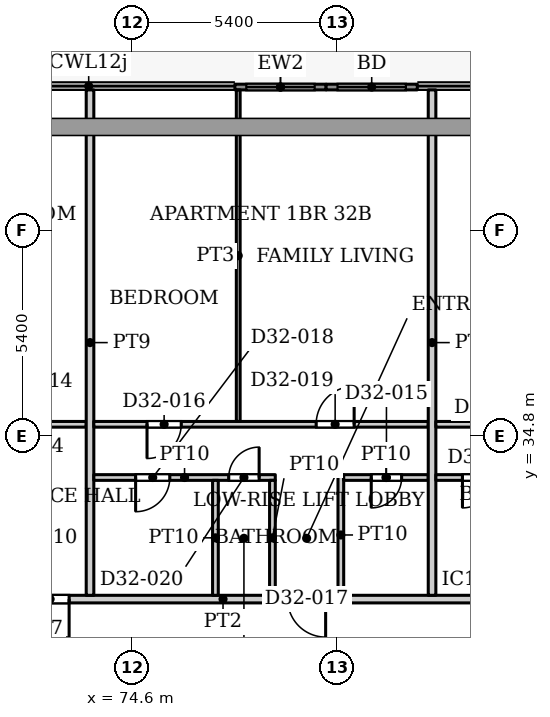
"""IFC4 building model, lengths in metres.
Left out: names, types, materials, properties, quantities, classifications, styles, units other than length and angle.
Written with IfcOpenShell. Run it as: python <this file> out.ifc"""

import sys

from ifc_helpers import new_model, si_unit, direction, frame, frame_2d, origin, place, context, subcontext, project, spatial, rectangle, extrude, source, transform, mapped, element, fill, save


model = new_model("IFC4")
c1 = context("Model", 3, precision=1e-05, world=origin(), true_north=direction((0.0, 1.0)))
c2 = subcontext(c1, "Body", "Model", "MODEL_VIEW")
j1 = project(units=[si_unit("LENGTHUNIT", "METRE"), si_unit("PLANEANGLEUNIT", "RADIAN")], contexts=[c1])
p1 = place(None, origin())
s1 = spatial("IfcSite", under=j1, at=p1, CompositionType="ELEMENT")
p2 = place(p1, origin())
s2 = spatial("IfcBuilding", under=s1, at=p2, CompositionType="ELEMENT")
p3 = place(p2, frame((0.0, 0.0, 137.0)))
s3 = spatial("IfcBuildingStorey", under=s2, at=p3, CompositionType="ELEMENT", Elevation=137.0)
p4 = place(p3, frame((77.312, 43.975, 0.0), z_axis=(0.0, 0.0, 1.0), x_axis=(1.0, 0.0, 0.0)))
e1 = element("IfcWall", 1, at=p4, inside=s3, PredefinedType="SOLIDWALL", context=c2, shape_type="SweptSolid", body=[
    extrude(rectangle(XDim=2.4, YDim=0.15, at=frame_2d((1.2, 0.0))), origin(), (0.0, 0.0, 1.0), 3.75),
])
p5 = place(p4, frame((0.3, 0.0, 0.0)))
e2 = element("IfcOpeningElement", 2, at=p5, cuts=e1, PredefinedType="OPENING", context=c2, shape_type="SweptSolid", body=[
    extrude(rectangle(XDim=1.8, YDim=2.4, at=frame_2d((0.9, 1.2))), frame((0.0, 0.085, 0.0), z_axis=(0.0, -1.0, 0.0), x_axis=(1.0, 0.0, 0.0)), (0.0, 0.0, 1.0), 0.17),
])
p6 = place(p3, frame((79.712, 43.975, 0.0), z_axis=(0.0, 0.0, 1.0), x_axis=(1.0, 0.0, 0.0)))
e3 = element("IfcWall", 3, at=p6, inside=s3, PredefinedType="SOLIDWALL", context=c2, shape_type="SweptSolid", body=[
    extrude(rectangle(XDim=2.4, YDim=0.15, at=frame_2d((1.2, 0.0))), origin(), (0.0, 0.0, 1.0), 3.75),
])
p7 = place(p6, frame((0.3, 0.0, 0.0)))
e4 = element("IfcOpeningElement", 4, at=p7, cuts=e3, PredefinedType="OPENING", context=c2, shape_type="SweptSolid", body=[
    extrude(rectangle(XDim=1.8, YDim=2.4, at=frame_2d((0.9, 1.2))), frame((0.0, 0.085, 0.0), z_axis=(0.0, -1.0, 0.0), x_axis=(1.0, 0.0, 0.0)), (0.0, 0.0, 1.0), 0.17),
])
p8 = place(p3, frame((55.9, 30.5, 0.0), z_axis=(0.0, 0.0, 1.0), x_axis=(1.0, 0.0, 0.0)))
e5 = element("IfcWall", 5, at=p8, inside=s3, PredefinedType="PARTITIONING", context=c2, shape_type="SweptSolid", body=[
    extrude(rectangle(XDim=42.2, YDim=0.2, at=frame_2d((21.1, 0.0))), origin(), (0.0, 0.0, 1.0), 3.6),
])
p9 = place(p8, frame((16.05, 0.0, 0.0)))
e6 = element("IfcOpeningElement", 6, at=p9, cuts=e5, PredefinedType="OPENING", context=c2, shape_type="SweptSolid", body=[
    extrude(rectangle(XDim=1.0, YDim=2.1, at=frame_2d((0.5, 1.05))), frame((0.0, 0.11, 0.0), z_axis=(0.0, -1.0, 0.0), x_axis=(1.0, 0.0, 0.0)), (0.0, 0.0, 1.0), 0.22),
])
p10 = place(p8, frame((22.8, 0.0, 0.0)))
e7 = element("IfcOpeningElement", 7, at=p10, cuts=e5, PredefinedType="OPENING", context=c2, shape_type="SweptSolid", body=[
    extrude(rectangle(XDim=1.0, YDim=2.1, at=frame_2d((0.5, 1.05))), frame((0.0, 0.11, 0.0), z_axis=(0.0, -1.0, 0.0), x_axis=(1.0, 0.0, 0.0)), (0.0, 0.0, 1.0), 0.22),
])
p11 = place(p8, frame((29.55, 0.0, 0.0)))
e8 = element("IfcOpeningElement", 8, at=p11, cuts=e5, PredefinedType="OPENING", context=c2, shape_type="SweptSolid", body=[
    extrude(rectangle(XDim=1.0, YDim=2.1, at=frame_2d((0.5, 1.05))), frame((0.0, 0.11, 0.0), z_axis=(0.0, -1.0, 0.0), x_axis=(1.0, 0.0, 0.0)), (0.0, 0.0, 1.0), 0.22),
])
p12 = place(p3, frame((55.9, 35.1, 0.0), z_axis=(0.0, 0.0, 1.0), x_axis=(1.0, 0.0, 0.0)))
e9 = element("IfcWall", 9, at=p12, inside=s3, PredefinedType="PARTITIONING", context=c2, shape_type="SweptSolid", body=[
    extrude(rectangle(XDim=17.5, YDim=0.15, at=frame_2d((8.75, 0.0))), origin(), (0.0, 0.0, 1.0), 3.6),
])
p13 = place(p12, frame((0.95, 0.0, 0.0)))
e10 = element("IfcOpeningElement", 10, at=p13, cuts=e9, PredefinedType="OPENING", context=c2, shape_type="SweptSolid", body=[
    extrude(rectangle(XDim=0.9, YDim=2.1, at=frame_2d((0.45, 1.05))), frame((0.0, 0.085, 0.0), z_axis=(0.0, -1.0, 0.0), x_axis=(1.0, 0.0, 0.0)), (0.0, 0.0, 1.0), 0.17),
])
p14 = place(p12, frame((15.35, 0.0, 0.0)))
e11 = element("IfcOpeningElement", 11, at=p14, cuts=e9, PredefinedType="OPENING", context=c2, shape_type="SweptSolid", body=[
    extrude(rectangle(XDim=0.9, YDim=2.1, at=frame_2d((0.45, 1.05))), frame((0.0, 0.085, 0.0), z_axis=(0.0, -1.0, 0.0), x_axis=(1.0, 0.0, 0.0)), (0.0, 0.0, 1.0), 0.17),
])
p15 = place(p12, frame((7.5, 0.0, 0.0)))
e12 = element("IfcOpeningElement", 12, at=p15, cuts=e9, PredefinedType="OPENING", context=c2, shape_type="SweptSolid", body=[
    extrude(rectangle(XDim=1.0, YDim=2.1, at=frame_2d((0.5, 1.05))), frame((0.0, 0.085, 0.0), z_axis=(0.0, -1.0, 0.0), x_axis=(1.0, 0.0, 0.0)), (0.0, 0.0, 1.0), 0.17),
])
p16 = place(p12, frame((3.6, 0.0, 0.0)))
e13 = element("IfcOpeningElement", 13, at=p16, cuts=e9, PredefinedType="OPENING", context=c2, shape_type="SweptSolid", body=[
    extrude(rectangle(XDim=1.6, YDim=2.1, at=frame_2d((0.8, 1.05))), frame((0.0, 0.085, 0.0), z_axis=(0.0, -1.0, 0.0), x_axis=(1.0, 0.0, 0.0)), (0.0, 0.0, 1.0), 0.17),
])
p17 = place(p12, frame((10.55, 0.0, 0.0)))
e14 = element("IfcOpeningElement", 14, at=p17, cuts=e9, PredefinedType="OPENING", context=c2, shape_type="SweptSolid", body=[
    extrude(rectangle(XDim=0.9, YDim=2.1, at=frame_2d((0.45, 1.05))), frame((0.0, 0.085, 0.0), z_axis=(0.0, -1.0, 0.0), x_axis=(1.0, 0.0, 0.0)), (0.0, 0.0, 1.0), 0.17),
])
p18 = place(p3, frame((73.5, 30.6, 0.0), z_axis=(0.0, 0.0, 1.0), x_axis=(0.0, 1.0, 0.0)))
e15 = element("IfcWall", 15, at=p18, inside=s3, PredefinedType="PARTITIONING", context=c2, shape_type="SweptSolid", body=[
    extrude(rectangle(XDim=13.3, YDim=0.2, at=frame_2d((6.65, 0.0))), origin(), (0.0, 0.0, 1.0), 3.6),
])
p19 = place(p3, frame((73.6, 33.7, 0.0), z_axis=(0.0, 0.0, 1.0), x_axis=(1.0, 0.0, 0.0)))
e16 = element("IfcWall", 16, at=p19, inside=s3, PredefinedType="PARTITIONING", context=c2, shape_type="SweptSolid", body=[
    extrude(rectangle(XDim=4.775, YDim=0.15, at=frame_2d((2.387, 0.0))), origin(), (0.0, 0.0, 1.0), 3.6),
])
p20 = place(p19, frame((1.1, 0.0, 0.0)))
e17 = element("IfcOpeningElement", 17, at=p20, cuts=e16, PredefinedType="OPENING", context=c2, shape_type="SweptSolid", body=[
    extrude(rectangle(XDim=0.9, YDim=2.1, at=frame_2d((0.45, 1.05))), frame((0.0, 0.085, 0.0), z_axis=(0.0, -1.0, 0.0), x_axis=(1.0, 0.0, 0.0)), (0.0, 0.0, 1.0), 0.17),
])
p21 = place(p19, frame((3.55, 0.0, 0.0)))
e18 = element("IfcOpeningElement", 18, at=p21, cuts=e16, PredefinedType="OPENING", context=c2, shape_type="SweptSolid", body=[
    extrude(rectangle(XDim=0.8, YDim=2.1, at=frame_2d((0.4, 1.05))), frame((0.0, 0.085, 0.0), z_axis=(0.0, -1.0, 0.0), x_axis=(1.0, 0.0, 0.0)), (0.0, 0.0, 1.0), 0.17),
])
p22 = place(p3, frame((73.6, 35.1, 0.0), z_axis=(0.0, 0.0, 1.0), x_axis=(1.0, 0.0, 0.0)))
e19 = element("IfcWall", 19, at=p22, inside=s3, PredefinedType="PARTITIONING", context=c2, shape_type="SweptSolid", body=[
    extrude(rectangle(XDim=8.8, YDim=0.15, at=frame_2d((4.4, 0.0))), origin(), (0.0, 0.0, 1.0), 3.6),
])
p23 = place(p22, frame((1.4, 0.0, 0.0)))
e20 = element("IfcOpeningElement", 20, at=p23, cuts=e19, PredefinedType="OPENING", context=c2, shape_type="SweptSolid", body=[
    extrude(rectangle(XDim=0.9, YDim=2.1, at=frame_2d((0.45, 1.05))), frame((0.0, 0.085, 0.0), z_axis=(0.0, -1.0, 0.0), x_axis=(1.0, 0.0, 0.0)), (0.0, 0.0, 1.0), 0.17),
])
p24 = place(p22, frame((5.85, 0.0, 0.0)))
e21 = element("IfcOpeningElement", 21, at=p24, cuts=e19, PredefinedType="OPENING", context=c2, shape_type="SweptSolid", body=[
    extrude(rectangle(XDim=1.0, YDim=2.1, at=frame_2d((0.5, 1.05))), frame((0.0, 0.085, 0.0), z_axis=(0.0, -1.0, 0.0), x_axis=(1.0, 0.0, 0.0)), (0.0, 0.0, 1.0), 0.17),
])
p25 = place(p3, frame((76.8, 30.6, 0.0), z_axis=(0.0, 0.0, 1.0), x_axis=(0.0, 1.0, 0.0)))
e22 = element("IfcWall", 22, at=p25, inside=s3, PredefinedType="PARTITIONING", context=c2, shape_type="SweptSolid", body=[
    extrude(rectangle(XDim=3.025, YDim=0.15, at=frame_2d((1.512, 0.0))), origin(), (0.0, 0.0, 1.0), 3.6),
])
p26 = place(p3, frame((77.4, 35.175, 0.0), z_axis=(0.0, 0.0, 1.0), x_axis=(0.0, 1.0, 0.0)))
e23 = element("IfcWall", 23, at=p26, inside=s3, PredefinedType="PARTITIONING", context=c2, shape_type="SweptSolid", body=[
    extrude(rectangle(XDim=8.725, YDim=0.1, at=frame_2d((4.362, 0.0))), origin(), (0.0, 0.0, 1.0), 3.6),
])
p27 = place(p3, frame((78.3, 30.6, 0.0), z_axis=(0.0, 0.0, 1.0), x_axis=(0.0, 1.0, 0.0)))
e24 = element("IfcWall", 24, at=p27, inside=s3, PredefinedType="PARTITIONING", context=c2, shape_type="SweptSolid", body=[
    extrude(rectangle(XDim=3.025, YDim=0.15, at=frame_2d((1.512, 0.0))), origin(), (0.0, 0.0, 1.0), 3.6),
])
p28 = place(p3, frame((80.1, 30.6, 0.0), z_axis=(0.0, 0.0, 1.0), x_axis=(0.0, 1.0, 0.0)))
e25 = element("IfcWall", 25, at=p28, inside=s3, PredefinedType="PARTITIONING", context=c2, shape_type="SweptSolid", body=[
    extrude(rectangle(XDim=3.175, YDim=0.15, at=frame_2d((1.587, 0.0))), origin(), (0.0, 0.0, 1.0), 3.6),
])
p29 = place(p3, frame((80.175, 33.7, 0.0), z_axis=(0.0, 0.0, 1.0), x_axis=(1.0, 0.0, 0.0)))
e26 = element("IfcWall", 26, at=p29, inside=s3, PredefinedType="PARTITIONING", context=c2, shape_type="SweptSolid", body=[
    extrude(rectangle(XDim=2.225, YDim=0.15, at=frame_2d((1.112, 0.0))), origin(), (0.0, 0.0, 1.0), 3.6),
])
p30 = place(p29, frame((0.725, 0.0, 0.0)))
e27 = element("IfcOpeningElement", 27, at=p30, cuts=e26, PredefinedType="OPENING", context=c2, shape_type="SweptSolid", body=[
    extrude(rectangle(XDim=0.8, YDim=2.1, at=frame_2d((0.4, 1.05))), frame((0.0, 0.085, 0.0), z_axis=(0.0, -1.0, 0.0), x_axis=(1.0, 0.0, 0.0)), (0.0, 0.0, 1.0), 0.17),
])
p31 = place(p3, frame((82.5, 30.6, 0.0), z_axis=(0.0, 0.0, 1.0), x_axis=(0.0, 1.0, 0.0)))
e28 = element("IfcWall", 28, at=p31, inside=s3, PredefinedType="PARTITIONING", context=c2, shape_type="SweptSolid", body=[
    extrude(rectangle(XDim=13.3, YDim=0.2, at=frame_2d((6.65, 0.0))), origin(), (0.0, 0.0, 1.0), 3.6),
])
p32 = place(p3, frame((82.6, 33.7, 0.0), z_axis=(0.0, 0.0, 1.0), x_axis=(1.0, 0.0, 0.0)))
e29 = element("IfcWall", 29, at=p32, inside=s3, PredefinedType="PARTITIONING", context=c2, shape_type="SweptSolid", body=[
    extrude(rectangle(XDim=2.225, YDim=0.15, at=frame_2d((1.112, 0.0))), origin(), (0.0, 0.0, 1.0), 3.6),
])
p33 = place(p32, frame((0.7, 0.0, 0.0)))
e30 = element("IfcOpeningElement", 30, at=p33, cuts=e29, PredefinedType="OPENING", context=c2, shape_type="SweptSolid", body=[
    extrude(rectangle(XDim=0.8, YDim=2.1, at=frame_2d((0.4, 1.05))), frame((0.0, 0.085, 0.0), z_axis=(0.0, -1.0, 0.0), x_axis=(1.0, 0.0, 0.0)), (0.0, 0.0, 1.0), 0.17),
])
p34 = place(p3, frame((82.6, 35.1, 0.0), z_axis=(0.0, 0.0, 1.0), x_axis=(1.0, 0.0, 0.0)))
e31 = element("IfcWall", 31, at=p34, inside=s3, PredefinedType="PARTITIONING", context=c2, shape_type="SweptSolid", body=[
    extrude(rectangle(XDim=17.3, YDim=0.15, at=frame_2d((8.65, 0.0))), origin(), (0.0, 0.0, 1.0), 3.6),
])
p35 = place(p34, frame((4.85, 0.0, 0.0)))
e32 = element("IfcOpeningElement", 32, at=p35, cuts=e31, PredefinedType="OPENING", context=c2, shape_type="SweptSolid", body=[
    extrude(rectangle(XDim=0.9, YDim=2.1, at=frame_2d((0.45, 1.05))), frame((0.0, 0.085, 0.0), z_axis=(0.0, -1.0, 0.0), x_axis=(1.0, 0.0, 0.0)), (0.0, 0.0, 1.0), 0.17),
])
p36 = place(p34, frame((11.15, 0.0, 0.0)))
e33 = element("IfcOpeningElement", 33, at=p36, cuts=e31, PredefinedType="OPENING", context=c2, shape_type="SweptSolid", body=[
    extrude(rectangle(XDim=0.9, YDim=2.1, at=frame_2d((0.45, 1.05))), frame((0.0, 0.085, 0.0), z_axis=(0.0, -1.0, 0.0), x_axis=(1.0, 0.0, 0.0)), (0.0, 0.0, 1.0), 0.17),
])
p37 = place(p34, frame((7.65, 0.0, 0.0)))
e34 = element("IfcOpeningElement", 34, at=p37, cuts=e31, PredefinedType="OPENING", context=c2, shape_type="SweptSolid", body=[
    extrude(rectangle(XDim=1.0, YDim=2.1, at=frame_2d((0.5, 1.05))), frame((0.0, 0.085, 0.0), z_axis=(0.0, -1.0, 0.0), x_axis=(1.0, 0.0, 0.0)), (0.0, 0.0, 1.0), 0.17),
])
p38 = place(p34, frame((1.2, 0.0, 0.0)))
e35 = element("IfcOpeningElement", 35, at=p38, cuts=e31, PredefinedType="OPENING", context=c2, shape_type="SweptSolid", body=[
    extrude(rectangle(XDim=1.6, YDim=2.1, at=frame_2d((0.8, 1.05))), frame((0.0, 0.085, 0.0), z_axis=(0.0, -1.0, 0.0), x_axis=(1.0, 0.0, 0.0)), (0.0, 0.0, 1.0), 0.17),
])
p39 = place(p34, frame((15.95, 0.0, 0.0)))
e36 = element("IfcOpeningElement", 36, at=p39, cuts=e31, PredefinedType="OPENING", context=c2, shape_type="SweptSolid", body=[
    extrude(rectangle(XDim=0.9, YDim=2.1, at=frame_2d((0.45, 1.05))), frame((0.0, 0.085, 0.0), z_axis=(0.0, -1.0, 0.0), x_axis=(1.0, 0.0, 0.0)), (0.0, 0.0, 1.0), 0.17),
])
m1 = source(origin(), c2, "Body", "SweptSolid", [
    extrude(rectangle(XDim=1.8, YDim=2.4, at=frame_2d((0.9, 1.2))), frame((0.0, 0.025, 0.0), z_axis=(0.0, -1.0, 0.0), x_axis=(1.0, 0.0, 0.0)), (0.0, 0.0, 1.0), 0.05),
])
p40 = place(p5, origin())
e37 = element("IfcDoor", 37, at=p40, inside=s3, OperationType="SLIDING_TO_LEFT", PredefinedType="DOOR", context=c2, shape_type="MappedRepresentation", body=[
    mapped(m1, transform((0.0, 0.0, 0.0), x_axis=(1.0, 0.0, 0.0), y_axis=(0.0, 1.0, 0.0), z_axis=(0.0, 0.0, 1.0), scale=1.0)),
])
fill(e2, e37)
p41 = place(p7, origin())
e38 = element("IfcDoor", 38, at=p41, inside=s3, OperationType="SLIDING_TO_LEFT", PredefinedType="DOOR", context=c2, shape_type="MappedRepresentation", body=[
    mapped(m1, transform((0.0, 0.0, 0.0), x_axis=(1.0, 0.0, 0.0), y_axis=(0.0, 1.0, 0.0), z_axis=(0.0, 0.0, 1.0), scale=1.0)),
])
fill(e4, e38)
m2 = source(origin(), c2, "Body", "SweptSolid", [
    extrude(rectangle(XDim=1.0, YDim=2.1, at=frame_2d((0.5, 1.05))), frame((0.0, 0.025, 0.0), z_axis=(0.0, -1.0, 0.0), x_axis=(1.0, 0.0, 0.0)), (0.0, 0.0, 1.0), 0.05),
])
p42 = place(p9, origin())
e39 = element("IfcDoor", 39, at=p42, inside=s3, OperationType="SINGLE_SWING_RIGHT", PredefinedType="DOOR", context=c2, shape_type="MappedRepresentation", body=[
    mapped(m2, transform((0.0, 0.0, 0.0), x_axis=(1.0, 0.0, 0.0), y_axis=(0.0, 1.0, 0.0), z_axis=(0.0, 0.0, 1.0), scale=1.0)),
])
fill(e6, e39)
m3 = source(origin(), c2, "Body", "SweptSolid", [
    extrude(rectangle(XDim=0.8, YDim=2.1, at=frame_2d((0.4, 1.05))), frame((0.0, 0.025, 0.0), z_axis=(0.0, -1.0, 0.0), x_axis=(1.0, 0.0, 0.0)), (0.0, 0.0, 1.0), 0.05),
])
p43 = place(p30, origin())
e40 = element("IfcDoor", 40, at=p43, inside=s3, OperationType="SINGLE_SWING_RIGHT", PredefinedType="DOOR", context=c2, shape_type="MappedRepresentation", body=[
    mapped(m3, transform((0.0, 0.0, 0.0), x_axis=(1.0, 0.0, 0.0), y_axis=(0.0, 1.0, 0.0), z_axis=(0.0, 0.0, 1.0), scale=1.0)),
])
fill(e27, e40)
m4 = source(origin(), c2, "Body", "SweptSolid", [
    extrude(rectangle(XDim=0.9, YDim=2.1, at=frame_2d((0.45, 1.05))), frame((0.0, 0.025, 0.0), z_axis=(0.0, -1.0, 0.0), x_axis=(1.0, 0.0, 0.0)), (0.0, 0.0, 1.0), 0.05),
])
p44 = place(p23, origin())
e41 = element("IfcDoor", 41, at=p44, inside=s3, OperationType="SINGLE_SWING_RIGHT", PredefinedType="DOOR", context=c2, shape_type="MappedRepresentation", body=[
    mapped(m4, transform((0.0, 0.0, 0.0), x_axis=(1.0, 0.0, 0.0), y_axis=(0.0, 1.0, 0.0), z_axis=(0.0, 0.0, 1.0), scale=1.0)),
])
fill(e20, e41)
p45 = place(p10, origin())
e42 = element("IfcDoor", 42, at=p45, inside=s3, OperationType="SINGLE_SWING_RIGHT", PredefinedType="DOOR", context=c2, shape_type="MappedRepresentation", body=[
    mapped(m2, transform((0.0, 0.0, 0.0), x_axis=(1.0, 0.0, 0.0), y_axis=(0.0, 1.0, 0.0), z_axis=(0.0, 0.0, 1.0), scale=1.0)),
])
fill(e7, e42)
p46 = place(p20, origin())
e43 = element("IfcDoor", 43, at=p46, inside=s3, OperationType="SINGLE_SWING_RIGHT", PredefinedType="DOOR", context=c2, shape_type="MappedRepresentation", body=[
    mapped(m4, transform((0.0, 0.0, 0.0), x_axis=(1.0, 0.0, 0.0), y_axis=(0.0, 1.0, 0.0), z_axis=(0.0, 0.0, 1.0), scale=1.0)),
])
fill(e17, e43)
m5 = source(origin(), c2, "Body", "SweptSolid", [
    extrude(rectangle(XDim=1.0, YDim=2.1, at=frame_2d((0.5, 1.05))), frame((0.0, 0.025, 0.0), z_axis=(0.0, -1.0, 0.0), x_axis=(1.0, 0.0, 0.0)), (0.0, 0.0, 1.0), 0.05),
])
p47 = place(p24, origin())
e44 = element("IfcDoor", 44, at=p47, inside=s3, OperationType="SINGLE_SWING_LEFT", PredefinedType="DOOR", context=c2, shape_type="MappedRepresentation", body=[
    mapped(m5, transform((0.0, 0.0, 0.0), x_axis=(1.0, 0.0, 0.0), y_axis=(0.0, 1.0, 0.0), z_axis=(0.0, 0.0, 1.0), scale=1.0)),
])
fill(e21, e44)
p48 = place(p21, origin())
e45 = element("IfcDoor", 45, at=p48, inside=s3, OperationType="SINGLE_SWING_LEFT", PredefinedType="DOOR", context=c2, shape_type="MappedRepresentation", body=[
    mapped(m3, transform((0.0, 0.0, 0.0), x_axis=(1.0, 0.0, 0.0), y_axis=(0.0, 1.0, 0.0), z_axis=(0.0, 0.0, 1.0), scale=1.0)),
])
fill(e18, e45)
p49 = place(p33, origin())
e46 = element("IfcDoor", 46, at=p49, inside=s3, OperationType="SINGLE_SWING_RIGHT", PredefinedType="DOOR", context=c2, shape_type="MappedRepresentation", body=[
    mapped(m3, transform((0.0, 0.0, 0.0), x_axis=(1.0, 0.0, 0.0), y_axis=(0.0, 1.0, 0.0), z_axis=(0.0, 0.0, 1.0), scale=1.0)),
])
fill(e30, e46)
save(model, sys.argv[1])
